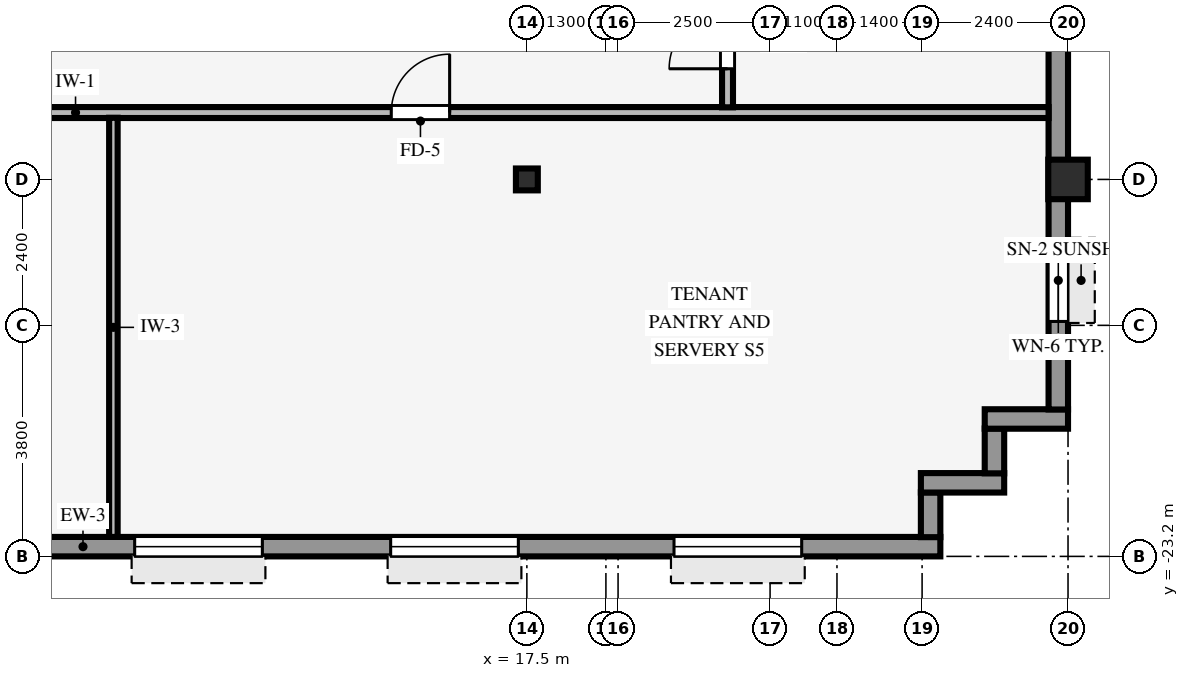
"""IFC4 building model, lengths in metres.
Left out: names, types, materials, properties, quantities, classifications, styles, units other than length and angle.
Written with IfcOpenShell. Run it as: python <this file> out.ifc"""

import sys

from ifc_helpers import new_model, si_unit, direction, frame, frame_2d, origin, origin_2d, place, context, subcontext, project, spatial, rectangle, hollow_rectangle, i_section, extrude, source, transform, mapped, element, fill, save


model = new_model("IFC4")
c1 = context("Model", 3, precision=1e-05, world=origin(), true_north=direction((0.0, 1.0)))
c2 = subcontext(c1, "Body", "Model", "MODEL_VIEW")
j1 = project(units=[si_unit("LENGTHUNIT", "METRE"), si_unit("PLANEANGLEUNIT", "RADIAN")], contexts=[c1])
p1 = place(None, origin())
s1 = spatial("IfcSite", under=j1, at=p1, CompositionType="ELEMENT")
p2 = place(p1, origin())
s2 = spatial("IfcBuilding", under=s1, at=p2, CompositionType="ELEMENT")
p3 = place(p2, frame((0.0, 0.0, 160.35)))
s3 = spatial("IfcBuildingStorey", under=s2, at=p3, CompositionType="ELEMENT", Elevation=160.35)
p4 = place(p3, frame((26.4, -17.0, 0.0), z_axis=(0.0, 0.0, 1.0), x_axis=(1.0, 0.0, 0.0)))
e1 = element("IfcColumn", 1, at=p4, inside=s3, PredefinedType="COLUMN", context=c2, shape_type="SweptSolid", body=[
    extrude(hollow_rectangle(XDim=0.65, YDim=0.65, WallThickness=0.04, InnerFilletRadius=0.04, OuterFilletRadius=0.08, at=origin_2d()), origin(), (0.0, 0.0, 1.0), 3.37),
])
p5 = place(p3, frame((17.5, -17.0, 0.0), z_axis=(0.0, 0.0, 1.0), x_axis=(1.0, 0.0, 0.0)))
e2 = element("IfcColumn", 2, at=p5, inside=s3, PredefinedType="COLUMN", context=c2, shape_type="SweptSolid", body=[
    extrude(i_section(OverallWidth=0.36, OverallDepth=0.36, WebThickness=0.021, FlangeThickness=0.021, FilletRadius=0.018, at=origin_2d()), origin(), (0.0, 0.0, 1.0), 3.37),
])
p6 = place(p3, frame((-24.3, -23.04, 0.0), z_axis=(0.0, 0.0, 1.0), x_axis=(1.0, 0.0, 0.0)))
e3 = element("IfcWall", 3, at=p6, inside=s3, PredefinedType="STANDARD", context=c2, shape_type="SweptSolid", body=[
    extrude(rectangle(XDim=48.6, YDim=0.32, at=frame_2d((24.3, 0.0))), origin(), (0.0, 0.0, 1.0), 2.705),
])
p7 = place(p6, frame((19.98, 0.0, 0.0), z_axis=(0.0, 0.0, 1.0), x_axis=(-1.0, 0.0, 0.0)))
e4 = element("IfcOpeningElement", 4, at=p7, cuts=e3, PredefinedType="OPENING", context=c2, shape_type="SweptSolid", body=[
    extrude(rectangle(XDim=0.98, YDim=2.15, at=frame_2d((0.49, 1.075))), frame((0.0, 0.17, 0.0), z_axis=(0.0, -1.0, 0.0), x_axis=(1.0, 0.0, 0.0)), (0.0, 0.0, 1.0), 0.34),
])
p8 = place(p6, frame((2.28, 0.0, 0.8)))
e5 = element("IfcOpeningElement", 5, at=p8, cuts=e3, PredefinedType="OPENING", context=c2, shape_type="SweptSolid", body=[
    extrude(rectangle(XDim=2.1, YDim=1.56, at=frame_2d((1.05, 0.78))), frame((0.0, 0.17, 0.0), z_axis=(0.0, -1.0, 0.0), x_axis=(1.0, 0.0, 0.0)), (0.0, 0.0, 1.0), 0.34),
])
p9 = place(p6, frame((6.04, 0.0, 0.8)))
e6 = element("IfcOpeningElement", 6, at=p9, cuts=e3, PredefinedType="OPENING", context=c2, shape_type="SweptSolid", body=[
    extrude(rectangle(XDim=2.1, YDim=1.56, at=frame_2d((1.05, 0.78))), frame((0.0, 0.17, 0.0), z_axis=(0.0, -1.0, 0.0), x_axis=(1.0, 0.0, 0.0)), (0.0, 0.0, 1.0), 0.34),
])
p10 = place(p6, frame((11.6, 0.0, 0.8)))
e7 = element("IfcOpeningElement", 7, at=p10, cuts=e3, PredefinedType="OPENING", context=c2, shape_type="SweptSolid", body=[
    extrude(rectangle(XDim=2.1, YDim=1.56, at=frame_2d((1.05, 0.78))), frame((0.0, 0.17, 0.0), z_axis=(0.0, -1.0, 0.0), x_axis=(1.0, 0.0, 0.0)), (0.0, 0.0, 1.0), 0.34),
])
p11 = place(p6, frame((20.92, 0.0, 0.8)))
e8 = element("IfcOpeningElement", 8, at=p11, cuts=e3, PredefinedType="OPENING", context=c2, shape_type="SweptSolid", body=[
    extrude(rectangle(XDim=2.1, YDim=1.56, at=frame_2d((1.05, 0.78))), frame((0.0, 0.17, 0.0), z_axis=(0.0, -1.0, 0.0), x_axis=(1.0, 0.0, 0.0)), (0.0, 0.0, 1.0), 0.34),
])
p12 = place(p6, frame((26.93, 0.0, 0.8)))
e9 = element("IfcOpeningElement", 9, at=p12, cuts=e3, PredefinedType="OPENING", context=c2, shape_type="SweptSolid", body=[
    extrude(rectangle(XDim=2.1, YDim=1.56, at=frame_2d((1.05, 0.78))), frame((0.0, 0.17, 0.0), z_axis=(0.0, -1.0, 0.0), x_axis=(1.0, 0.0, 0.0)), (0.0, 0.0, 1.0), 0.34),
])
p13 = place(p6, frame((30.24, 0.0, 0.8)))
e10 = element("IfcOpeningElement", 10, at=p13, cuts=e3, PredefinedType="OPENING", context=c2, shape_type="SweptSolid", body=[
    extrude(rectangle(XDim=2.1, YDim=1.56, at=frame_2d((1.05, 0.78))), frame((0.0, 0.17, 0.0), z_axis=(0.0, -1.0, 0.0), x_axis=(1.0, 0.0, 0.0)), (0.0, 0.0, 1.0), 0.34),
])
p14 = place(p6, frame((35.35, 0.0, 0.8)))
e11 = element("IfcOpeningElement", 11, at=p14, cuts=e3, PredefinedType="OPENING", context=c2, shape_type="SweptSolid", body=[
    extrude(rectangle(XDim=2.1, YDim=1.56, at=frame_2d((1.05, 0.78))), frame((0.0, 0.17, 0.0), z_axis=(0.0, -1.0, 0.0), x_axis=(1.0, 0.0, 0.0)), (0.0, 0.0, 1.0), 0.34),
])
p15 = place(p6, frame((39.56, 0.0, 0.8)))
e12 = element("IfcOpeningElement", 12, at=p15, cuts=e3, PredefinedType="OPENING", context=c2, shape_type="SweptSolid", body=[
    extrude(rectangle(XDim=2.1, YDim=1.56, at=frame_2d((1.05, 0.78))), frame((0.0, 0.17, 0.0), z_axis=(0.0, -1.0, 0.0), x_axis=(1.0, 0.0, 0.0)), (0.0, 0.0, 1.0), 0.34),
])
p16 = place(p6, frame((44.22, 0.0, 0.8)))
e13 = element("IfcOpeningElement", 13, at=p16, cuts=e3, PredefinedType="OPENING", context=c2, shape_type="SweptSolid", body=[
    extrude(rectangle(XDim=2.1, YDim=1.56, at=frame_2d((1.05, 0.78))), frame((0.0, 0.17, 0.0), z_axis=(0.0, -1.0, 0.0), x_axis=(1.0, 0.0, 0.0)), (0.0, 0.0, 1.0), 0.34),
])
p17 = place(p3, frame((24.14, -22.884, 0.0), z_axis=(0.0, 0.0, 1.0), x_axis=(0.0, 1.0, 0.0)))
e14 = element("IfcWall", 14, at=p17, inside=s3, PredefinedType="STANDARD", context=c2, shape_type="SweptSolid", body=[
    extrude(rectangle(XDim=0.738, YDim=0.32, at=frame_2d((0.369, 0.0))), origin(), (0.0, 0.0, 1.0), 3.36),
])
p18 = place(p3, frame((23.98, -21.99, 0.0), z_axis=(0.0, 0.0, 1.0), x_axis=(1.0, 0.0, 0.0)))
e15 = element("IfcWall", 15, at=p18, inside=s3, PredefinedType="STANDARD", context=c2, shape_type="SweptSolid", body=[
    extrude(rectangle(XDim=1.37, YDim=0.32, at=frame_2d((0.685, 0.0))), origin(), (0.0, 0.0, 1.0), 3.36),
])
p19 = place(p3, frame((25.19, -21.834, 0.0), z_axis=(0.0, 0.0, 1.0), x_axis=(0.0, 1.0, 0.0)))
e16 = element("IfcWall", 16, at=p19, inside=s3, PredefinedType="STANDARD", context=c2, shape_type="SweptSolid", body=[
    extrude(rectangle(XDim=0.738, YDim=0.32, at=frame_2d((0.369, 0.0))), origin(), (0.0, 0.0, 1.0), 3.36),
])
p20 = place(p3, frame((25.03, -20.94, 0.0), z_axis=(0.0, 0.0, 1.0), x_axis=(1.0, 0.0, 0.0)))
e17 = element("IfcWall", 17, at=p20, inside=s3, PredefinedType="STANDARD", context=c2, shape_type="SweptSolid", body=[
    extrude(rectangle(XDim=1.37, YDim=0.32, at=frame_2d((0.685, 0.0))), origin(), (0.0, 0.0, 1.0), 3.36),
])
p21 = place(p3, frame((26.24, -20.784, 0.0), z_axis=(0.0, 0.0, 1.0), x_axis=(0.0, 1.0, 0.0)))
e18 = element("IfcWall", 18, at=p21, inside=s3, PredefinedType="STANDARD", context=c2, shape_type="SweptSolid", body=[
    extrude(rectangle(XDim=41.568, YDim=0.32, at=frame_2d((20.784, 0.0))), origin(), (0.0, 0.0, 1.0), 2.705),
])
p22 = place(p21, frame((1.448, 0.0, 0.8)))
e19 = element("IfcOpeningElement", 19, at=p22, cuts=e18, PredefinedType="OPENING", context=c2, shape_type="SweptSolid", body=[
    extrude(rectangle(XDim=1.35, YDim=1.56, at=frame_2d((0.675, 0.78))), frame((0.0, 0.17, 0.0), z_axis=(0.0, -1.0, 0.0), x_axis=(1.0, 0.0, 0.0)), (0.0, 0.0, 1.0), 0.34),
])
p23 = place(p21, frame((7.744, 0.0, 0.8)))
e20 = element("IfcOpeningElement", 20, at=p23, cuts=e18, PredefinedType="OPENING", context=c2, shape_type="SweptSolid", body=[
    extrude(rectangle(XDim=1.35, YDim=1.56, at=frame_2d((0.675, 0.78))), frame((0.0, 0.17, 0.0), z_axis=(0.0, -1.0, 0.0), x_axis=(1.0, 0.0, 0.0)), (0.0, 0.0, 1.0), 0.34),
])
p24 = place(p21, frame((12.69, 0.0, 0.8)))
e21 = element("IfcOpeningElement", 21, at=p24, cuts=e18, PredefinedType="OPENING", context=c2, shape_type="SweptSolid", body=[
    extrude(rectangle(XDim=1.35, YDim=1.56, at=frame_2d((0.675, 0.78))), frame((0.0, 0.17, 0.0), z_axis=(0.0, -1.0, 0.0), x_axis=(1.0, 0.0, 0.0)), (0.0, 0.0, 1.0), 0.34),
])
p25 = place(p21, frame((17.636, 0.0, 0.8)))
e22 = element("IfcOpeningElement", 22, at=p25, cuts=e18, PredefinedType="OPENING", context=c2, shape_type="SweptSolid", body=[
    extrude(rectangle(XDim=1.35, YDim=1.56, at=frame_2d((0.675, 0.78))), frame((0.0, 0.17, 0.0), z_axis=(0.0, -1.0, 0.0), x_axis=(1.0, 0.0, 0.0)), (0.0, 0.0, 1.0), 0.34),
])
p26 = place(p21, frame((22.582, 0.0, 0.8)))
e23 = element("IfcOpeningElement", 23, at=p26, cuts=e18, PredefinedType="OPENING", context=c2, shape_type="SweptSolid", body=[
    extrude(rectangle(XDim=1.35, YDim=1.56, at=frame_2d((0.675, 0.78))), frame((0.0, 0.17, 0.0), z_axis=(0.0, -1.0, 0.0), x_axis=(1.0, 0.0, 0.0)), (0.0, 0.0, 1.0), 0.34),
])
p27 = place(p21, frame((27.528, 0.0, 0.8)))
e24 = element("IfcOpeningElement", 24, at=p27, cuts=e18, PredefinedType="OPENING", context=c2, shape_type="SweptSolid", body=[
    extrude(rectangle(XDim=1.35, YDim=1.56, at=frame_2d((0.675, 0.78))), frame((0.0, 0.17, 0.0), z_axis=(0.0, -1.0, 0.0), x_axis=(1.0, 0.0, 0.0)), (0.0, 0.0, 1.0), 0.34),
])
p28 = place(p21, frame((32.474, 0.0, 0.8)))
e25 = element("IfcOpeningElement", 25, at=p28, cuts=e18, PredefinedType="OPENING", context=c2, shape_type="SweptSolid", body=[
    extrude(rectangle(XDim=1.35, YDim=1.56, at=frame_2d((0.675, 0.78))), frame((0.0, 0.17, 0.0), z_axis=(0.0, -1.0, 0.0), x_axis=(1.0, 0.0, 0.0)), (0.0, 0.0, 1.0), 0.34),
])
p29 = place(p21, frame((38.77, 0.0, 0.8)))
e26 = element("IfcOpeningElement", 26, at=p29, cuts=e18, PredefinedType="OPENING", context=c2, shape_type="SweptSolid", body=[
    extrude(rectangle(XDim=1.35, YDim=1.56, at=frame_2d((0.675, 0.78))), frame((0.0, 0.17, 0.0), z_axis=(0.0, -1.0, 0.0), x_axis=(1.0, 0.0, 0.0)), (0.0, 0.0, 1.0), 0.34),
])
p30 = place(p3, frame((-26.08, -15.9, 0.0), z_axis=(0.0, 0.0, 1.0), x_axis=(1.0, 0.0, 0.0)))
e27 = element("IfcWall", 27, at=p30, inside=s3, PredefinedType="PARTITIONING", context=c2, shape_type="SweptSolid", body=[
    extrude(rectangle(XDim=52.16, YDim=0.18, at=frame_2d((26.08, 0.0))), origin(), (0.0, 0.0, 1.0), 3.36),
])
p31 = place(p30, frame((41.35, 0.0, 0.0)))
e28 = element("IfcOpeningElement", 28, at=p31, cuts=e27, PredefinedType="OPENING", context=c2, shape_type="SweptSolid", body=[
    extrude(rectangle(XDim=0.96, YDim=2.1, at=frame_2d((0.48, 1.05))), frame((0.0, 0.1, 0.0), z_axis=(0.0, -1.0, 0.0), x_axis=(1.0, 0.0, 0.0)), (0.0, 0.0, 1.0), 0.2),
])
p32 = place(p30, frame((23.34, 0.0, 0.0)))
e29 = element("IfcOpeningElement", 29, at=p32, cuts=e27, PredefinedType="OPENING", context=c2, shape_type="SweptSolid", body=[
    extrude(rectangle(XDim=0.96, YDim=2.1, at=frame_2d((0.48, 1.05))), frame((0.0, 0.1, 0.0), z_axis=(0.0, -1.0, 0.0), x_axis=(1.0, 0.0, 0.0)), (0.0, 0.0, 1.0), 0.2),
])
p33 = place(p30, frame((14.4, 0.0, 0.0)))
e30 = element("IfcOpeningElement", 30, at=p33, cuts=e27, PredefinedType="OPENING", context=c2, shape_type="SweptSolid", body=[
    extrude(rectangle(XDim=0.96, YDim=2.1, at=frame_2d((0.48, 1.05))), frame((0.0, 0.1, 0.0), z_axis=(0.0, -1.0, 0.0), x_axis=(1.0, 0.0, 0.0)), (0.0, 0.0, 1.0), 0.2),
])
p34 = place(p30, frame((30.005, 0.0, 0.0)))
e31 = element("IfcOpeningElement", 31, at=p34, cuts=e27, PredefinedType="OPENING", context=c2, shape_type="SweptSolid", body=[
    extrude(rectangle(XDim=0.96, YDim=2.1, at=frame_2d((0.48, 1.05))), frame((0.0, 0.1, 0.0), z_axis=(0.0, -1.0, 0.0), x_axis=(1.0, 0.0, 0.0)), (0.0, 0.0, 1.0), 0.2),
])
p35 = place(p30, frame((6.65, 0.0, 0.0)))
e32 = element("IfcOpeningElement", 32, at=p35, cuts=e27, PredefinedType="OPENING", context=c2, shape_type="SweptSolid", body=[
    extrude(rectangle(XDim=0.96, YDim=2.1, at=frame_2d((0.48, 1.05))), frame((0.0, 0.1, 0.0), z_axis=(0.0, -1.0, 0.0), x_axis=(1.0, 0.0, 0.0)), (0.0, 0.0, 1.0), 0.2),
])
p36 = place(p3, frame((10.7, -22.88, 0.0), z_axis=(0.0, 0.0, 1.0), x_axis=(0.0, 1.0, 0.0)))
e33 = element("IfcWall", 33, at=p36, inside=s3, PredefinedType="PARTITIONING", context=c2, shape_type="SweptSolid", body=[
    extrude(rectangle(XDim=6.894, YDim=0.14, at=frame_2d((3.447, 0.0))), origin(), (0.0, 0.0, 1.0), 3.36),
])
p37 = place(p3, frame((20.8, -15.814, 0.0), z_axis=(0.0, 0.0, 1.0), x_axis=(0.0, 1.0, 0.0)))
e34 = element("IfcWall", 34, at=p37, inside=s3, PredefinedType="PARTITIONING", context=c2, shape_type="SweptSolid", body=[
    extrude(rectangle(XDim=2.228, YDim=0.18, at=frame_2d((1.114, 0.0))), origin(), (0.0, 0.0, 1.0), 3.36),
])
p38 = place(p37, frame((0.634, 0.0, 0.0)))
e35 = element("IfcOpeningElement", 35, at=p38, cuts=e34, PredefinedType="OPENING", context=c2, shape_type="SweptSolid", body=[
    extrude(rectangle(XDim=0.96, YDim=2.1, at=frame_2d((0.48, 1.05))), frame((0.0, 0.1, 0.0), z_axis=(0.0, -1.0, 0.0), x_axis=(1.0, 0.0, 0.0)), (0.0, 0.0, 1.0), 0.2),
])
m1 = source(origin(), c2, "Body", "SweptSolid", [
    extrude(rectangle(XDim=2.1, YDim=1.56, at=frame_2d((1.05, 0.78))), frame((0.0, 0.03, 0.0), z_axis=(0.0, -1.0, 0.0), x_axis=(1.0, 0.0, 0.0)), (0.0, 0.0, 1.0), 0.06),
])
p39 = place(p14, origin())
e36 = element("IfcWindow", 36, at=p39, inside=s3, PartitioningType="SINGLE_PANEL", PredefinedType="WINDOW", context=c2, shape_type="MappedRepresentation", body=[
    mapped(m1, transform((0.0, 0.0, 0.0), scale=1.0)),
])
fill(e11, e36)
p40 = place(p15, origin())
e37 = element("IfcWindow", 37, at=p40, inside=s3, PartitioningType="SINGLE_PANEL", PredefinedType="WINDOW", context=c2, shape_type="MappedRepresentation", body=[
    mapped(m1, transform((0.0, 0.0, 0.0), scale=1.0)),
])
fill(e12, e37)
p41 = place(p16, origin())
e38 = element("IfcWindow", 38, at=p41, inside=s3, PartitioningType="SINGLE_PANEL", PredefinedType="WINDOW", context=c2, shape_type="MappedRepresentation", body=[
    mapped(m1, transform((0.0, 0.0, 0.0), scale=1.0)),
])
fill(e13, e38)
m2 = source(origin(), c2, "Body", "SweptSolid", [
    extrude(rectangle(XDim=1.35, YDim=1.56, at=frame_2d((0.675, 0.78))), frame((0.0, 0.03, 0.0), z_axis=(0.0, -1.0, 0.0), x_axis=(1.0, 0.0, 0.0)), (0.0, 0.0, 1.0), 0.06),
])
p42 = place(p22, origin())
e39 = element("IfcWindow", 39, at=p42, inside=s3, PartitioningType="SINGLE_PANEL", PredefinedType="WINDOW", context=c2, shape_type="MappedRepresentation", body=[
    mapped(m2, transform((0.0, 0.0, 0.0), scale=1.0)),
])
fill(e19, e39)
m3 = source(origin(), c2, "Body", "SweptSolid", [
    extrude(rectangle(XDim=0.96, YDim=2.1, at=frame_2d((0.48, 1.05))), frame((0.0, 0.025, 0.0), z_axis=(0.0, -1.0, 0.0), x_axis=(1.0, 0.0, 0.0)), (0.0, 0.0, 1.0), 0.05),
])
p43 = place(p31, origin())
e40 = element("IfcDoor", 40, at=p43, inside=s3, OperationType="SINGLE_SWING_RIGHT", PredefinedType="DOOR", context=c2, shape_type="MappedRepresentation", body=[
    mapped(m3, transform((0.0, 0.0, 0.0), scale=1.0)),
])
fill(e28, e40)
p44 = place(p38, origin())
e41 = element("IfcDoor", 41, at=p44, inside=s3, OperationType="SINGLE_SWING_LEFT", PredefinedType="DOOR", context=c2, shape_type="MappedRepresentation", body=[
    mapped(m3, transform((0.0, 0.0, 0.0), scale=1.0)),
])
fill(e35, e41)
save(model, sys.argv[1])
